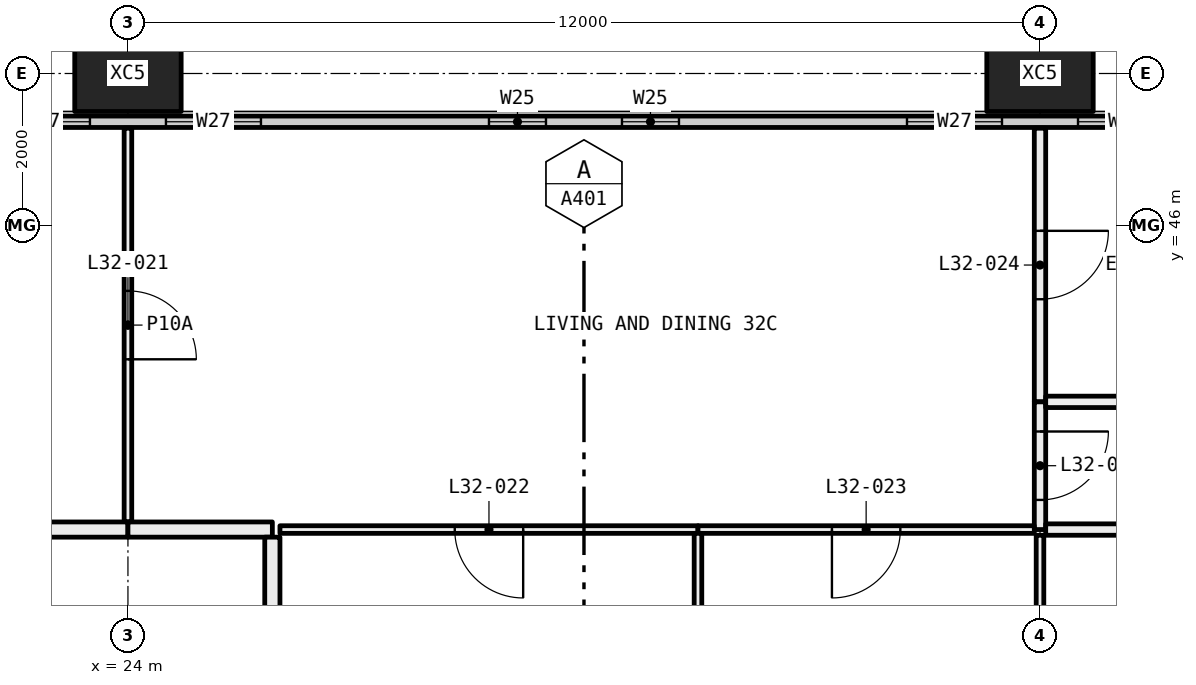
"""IFC4 building model, lengths in metres.
Left out: names, types, materials, properties, quantities, classifications, styles, units other than length and angle.
Written with IfcOpenShell. Run it as: python <this file> out.ifc"""

import sys

from ifc_helpers import new_model, si_unit, direction, frame, frame_2d, origin, origin_2d, place, context, subcontext, project, spatial, rectangle, hollow_rectangle, extrude, element, fill, save


model = new_model("IFC4")
c1 = context("Model", 3, precision=1e-05, world=origin(), true_north=direction((0.0, 1.0)))
c2 = subcontext(c1, "Body", "Model", "MODEL_VIEW")
j1 = project(units=[si_unit("LENGTHUNIT", "METRE"), si_unit("PLANEANGLEUNIT", "RADIAN")], contexts=[c1])
p1 = place(None, origin())
s1 = spatial("IfcSite", under=j1, at=p1, CompositionType="ELEMENT")
p2 = place(p1, origin())
s2 = spatial("IfcBuilding", under=s1, at=p2, CompositionType="ELEMENT")
p3 = place(p2, frame((0.0, 0.0, 124.2)))
s3 = spatial("IfcBuildingStorey", under=s2, at=p3, CompositionType="ELEMENT", Elevation=124.2)
for number, where, z_axis, x_axis in (
    (1, (24.0, 48.0, -0.4), (0.0, 0.0, 1.0), (1.0, 0.0, 0.0)),
    (2, (36.0, 48.0, -0.4), (0.0, 0.0, 1.0), (1.0, 0.0, 0.0)),
):
    element("IfcColumn", number, at=place(p3, frame(where, z_axis=z_axis, x_axis=x_axis)), inside=s3, PredefinedType="COLUMN", context=c2, shape_type="SweptSolid", body=[
        extrude(hollow_rectangle(XDim=1.4, YDim=1.0, WallThickness=0.055, at=origin_2d()), origin(), (0.0, 0.0, 1.0), 3.45),
    ])
p4 = place(p3, frame((6.56, 47.365, 0.0), z_axis=(0.0, 0.0, 1.0), x_axis=(1.0, 0.0, 0.0)))
e3 = element("IfcWall", 3, at=p4, inside=s3, PredefinedType="ELEMENTEDWALL", context=c2, shape_type="SweptSolid", body=[
    extrude(rectangle(XDim=58.88, YDim=0.15, at=frame_2d((29.44, 0.0))), origin(), (0.0, 0.0, 1.0), 3.05),
])
p5 = place(p4, frame((0.44, 0.0, 0.45)))
e4 = element("IfcOpeningElement", 4, at=p5, cuts=e3, PredefinedType="OPENING", context=c2, shape_type="SweptSolid", body=[
    extrude(rectangle(XDim=4.5, YDim=2.55, at=frame_2d((2.25, 1.275))), frame((0.0, 0.085, 0.0), z_axis=(0.0, -1.0, 0.0), x_axis=(1.0, 0.0, 0.0)), (0.0, 0.0, 1.0), 0.17),
])
p6 = place(p4, frame((5.94, 0.0, 0.45)))
e5 = element("IfcOpeningElement", 5, at=p6, cuts=e3, PredefinedType="OPENING", context=c2, shape_type="SweptSolid", body=[
    extrude(rectangle(XDim=1.25, YDim=2.55, at=frame_2d((0.625, 1.275))), frame((0.0, 0.085, 0.0), z_axis=(0.0, -1.0, 0.0), x_axis=(1.0, 0.0, 0.0)), (0.0, 0.0, 1.0), 0.17),
])
p7 = place(p4, frame((10.19, 0.0, 0.45)))
e6 = element("IfcOpeningElement", 6, at=p7, cuts=e3, PredefinedType="OPENING", context=c2, shape_type="SweptSolid", body=[
    extrude(rectangle(XDim=0.75, YDim=2.55, at=frame_2d((0.375, 1.275))), frame((0.0, 0.085, 0.0), z_axis=(0.0, -1.0, 0.0), x_axis=(1.0, 0.0, 0.0)), (0.0, 0.0, 1.0), 0.17),
])
p8 = place(p4, frame((11.94, 0.0, 0.45)))
e7 = element("IfcOpeningElement", 7, at=p8, cuts=e3, PredefinedType="OPENING", context=c2, shape_type="SweptSolid", body=[
    extrude(rectangle(XDim=0.75, YDim=2.55, at=frame_2d((0.375, 1.275))), frame((0.0, 0.085, 0.0), z_axis=(0.0, -1.0, 0.0), x_axis=(1.0, 0.0, 0.0)), (0.0, 0.0, 1.0), 0.17),
])
p9 = place(p4, frame((15.69, 0.0, 0.45)))
e8 = element("IfcOpeningElement", 8, at=p9, cuts=e3, PredefinedType="OPENING", context=c2, shape_type="SweptSolid", body=[
    extrude(rectangle(XDim=1.25, YDim=2.55, at=frame_2d((0.625, 1.275))), frame((0.0, 0.085, 0.0), z_axis=(0.0, -1.0, 0.0), x_axis=(1.0, 0.0, 0.0)), (0.0, 0.0, 1.0), 0.17),
])
p10 = place(p4, frame((17.94, 0.0, 0.45)))
e9 = element("IfcOpeningElement", 9, at=p10, cuts=e3, PredefinedType="OPENING", context=c2, shape_type="SweptSolid", body=[
    extrude(rectangle(XDim=1.25, YDim=2.55, at=frame_2d((0.625, 1.275))), frame((0.0, 0.085, 0.0), z_axis=(0.0, -1.0, 0.0), x_axis=(1.0, 0.0, 0.0)), (0.0, 0.0, 1.0), 0.17),
])
p11 = place(p4, frame((22.19, 0.0, 0.45)))
e10 = element("IfcOpeningElement", 10, at=p11, cuts=e3, PredefinedType="OPENING", context=c2, shape_type="SweptSolid", body=[
    extrude(rectangle(XDim=0.75, YDim=2.55, at=frame_2d((0.375, 1.275))), frame((0.0, 0.085, 0.0), z_axis=(0.0, -1.0, 0.0), x_axis=(1.0, 0.0, 0.0)), (0.0, 0.0, 1.0), 0.17),
])
p12 = place(p4, frame((23.94, 0.0, 0.45)))
e11 = element("IfcOpeningElement", 11, at=p12, cuts=e3, PredefinedType="OPENING", context=c2, shape_type="SweptSolid", body=[
    extrude(rectangle(XDim=0.75, YDim=2.55, at=frame_2d((0.375, 1.275))), frame((0.0, 0.085, 0.0), z_axis=(0.0, -1.0, 0.0), x_axis=(1.0, 0.0, 0.0)), (0.0, 0.0, 1.0), 0.17),
])
p13 = place(p4, frame((27.69, 0.0, 0.45)))
e12 = element("IfcOpeningElement", 12, at=p13, cuts=e3, PredefinedType="OPENING", context=c2, shape_type="SweptSolid", body=[
    extrude(rectangle(XDim=1.25, YDim=2.55, at=frame_2d((0.625, 1.275))), frame((0.0, 0.085, 0.0), z_axis=(0.0, -1.0, 0.0), x_axis=(1.0, 0.0, 0.0)), (0.0, 0.0, 1.0), 0.17),
])
p14 = place(p4, frame((29.94, 0.0, 0.45)))
e13 = element("IfcOpeningElement", 13, at=p14, cuts=e3, PredefinedType="OPENING", context=c2, shape_type="SweptSolid", body=[
    extrude(rectangle(XDim=1.25, YDim=2.55, at=frame_2d((0.625, 1.275))), frame((0.0, 0.085, 0.0), z_axis=(0.0, -1.0, 0.0), x_axis=(1.0, 0.0, 0.0)), (0.0, 0.0, 1.0), 0.17),
])
p15 = place(p4, frame((34.19, 0.0, 0.45)))
e14 = element("IfcOpeningElement", 14, at=p15, cuts=e3, PredefinedType="OPENING", context=c2, shape_type="SweptSolid", body=[
    extrude(rectangle(XDim=0.75, YDim=2.55, at=frame_2d((0.375, 1.275))), frame((0.0, 0.085, 0.0), z_axis=(0.0, -1.0, 0.0), x_axis=(1.0, 0.0, 0.0)), (0.0, 0.0, 1.0), 0.17),
])
p16 = place(p4, frame((35.94, 0.0, 0.45)))
e15 = element("IfcOpeningElement", 15, at=p16, cuts=e3, PredefinedType="OPENING", context=c2, shape_type="SweptSolid", body=[
    extrude(rectangle(XDim=0.75, YDim=2.55, at=frame_2d((0.375, 1.275))), frame((0.0, 0.085, 0.0), z_axis=(0.0, -1.0, 0.0), x_axis=(1.0, 0.0, 0.0)), (0.0, 0.0, 1.0), 0.17),
])
p17 = place(p4, frame((39.69, 0.0, 0.45)))
e16 = element("IfcOpeningElement", 16, at=p17, cuts=e3, PredefinedType="OPENING", context=c2, shape_type="SweptSolid", body=[
    extrude(rectangle(XDim=1.25, YDim=2.55, at=frame_2d((0.625, 1.275))), frame((0.0, 0.085, 0.0), z_axis=(0.0, -1.0, 0.0), x_axis=(1.0, 0.0, 0.0)), (0.0, 0.0, 1.0), 0.17),
])
p18 = place(p4, frame((41.94, 0.0, 0.45)))
e17 = element("IfcOpeningElement", 17, at=p18, cuts=e3, PredefinedType="OPENING", context=c2, shape_type="SweptSolid", body=[
    extrude(rectangle(XDim=1.25, YDim=2.55, at=frame_2d((0.625, 1.275))), frame((0.0, 0.085, 0.0), z_axis=(0.0, -1.0, 0.0), x_axis=(1.0, 0.0, 0.0)), (0.0, 0.0, 1.0), 0.17),
])
p19 = place(p4, frame((46.19, 0.0, 0.45)))
e18 = element("IfcOpeningElement", 18, at=p19, cuts=e3, PredefinedType="OPENING", context=c2, shape_type="SweptSolid", body=[
    extrude(rectangle(XDim=0.75, YDim=2.55, at=frame_2d((0.375, 1.275))), frame((0.0, 0.085, 0.0), z_axis=(0.0, -1.0, 0.0), x_axis=(1.0, 0.0, 0.0)), (0.0, 0.0, 1.0), 0.17),
])
p20 = place(p4, frame((47.94, 0.0, 0.45)))
e19 = element("IfcOpeningElement", 19, at=p20, cuts=e3, PredefinedType="OPENING", context=c2, shape_type="SweptSolid", body=[
    extrude(rectangle(XDim=0.75, YDim=2.55, at=frame_2d((0.375, 1.275))), frame((0.0, 0.085, 0.0), z_axis=(0.0, -1.0, 0.0), x_axis=(1.0, 0.0, 0.0)), (0.0, 0.0, 1.0), 0.17),
])
p21 = place(p4, frame((51.69, 0.0, 0.45)))
e20 = element("IfcOpeningElement", 20, at=p21, cuts=e3, PredefinedType="OPENING", context=c2, shape_type="SweptSolid", body=[
    extrude(rectangle(XDim=1.25, YDim=2.55, at=frame_2d((0.625, 1.275))), frame((0.0, 0.085, 0.0), z_axis=(0.0, -1.0, 0.0), x_axis=(1.0, 0.0, 0.0)), (0.0, 0.0, 1.0), 0.17),
])
p22 = place(p4, frame((53.94, 0.0, 0.45)))
e21 = element("IfcOpeningElement", 21, at=p22, cuts=e3, PredefinedType="OPENING", context=c2, shape_type="SweptSolid", body=[
    extrude(rectangle(XDim=4.5, YDim=2.55, at=frame_2d((2.25, 1.275))), frame((0.0, 0.085, 0.0), z_axis=(0.0, -1.0, 0.0), x_axis=(1.0, 0.0, 0.0)), (0.0, 0.0, 1.0), 0.17),
])
p23 = place(p3, frame((24.0, 42.1, 0.0), z_axis=(0.0, 0.0, 1.0), x_axis=(0.0, 1.0, 0.0)))
e22 = element("IfcWall", 22, at=p23, inside=s3, PredefinedType="PARTITIONING", context=c2, shape_type="SweptSolid", body=[
    extrude(rectangle(XDim=5.18, YDim=0.1, at=frame_2d((2.59, 0.0))), origin(), (0.0, 0.0, 1.0), 3.05),
])
p24 = place(p23, frame((2.14, 0.0, 0.0)))
e23 = element("IfcOpeningElement", 23, at=p24, cuts=e22, PredefinedType="OPENING", context=c2, shape_type="SweptSolid", body=[
    extrude(rectangle(XDim=0.9, YDim=2.1, at=frame_2d((0.45, 1.05))), frame((0.0, 0.06, 0.0), z_axis=(0.0, -1.0, 0.0), x_axis=(1.0, 0.0, 0.0)), (0.0, 0.0, 1.0), 0.12),
])
p25 = place(p3, frame((18.0, 42.0, 0.0), z_axis=(0.0, 0.0, 1.0), x_axis=(1.0, 0.0, 0.0)))
e24 = element("IfcWall", 24, at=p25, inside=s3, PredefinedType="PARTITIONING", context=c2, shape_type="SweptSolid", body=[
    extrude(rectangle(XDim=6.0, YDim=0.2, at=frame_2d((3.0, 0.0))), origin(), (0.0, 0.0, 1.0), 3.05),
])
p26 = place(p25, frame((2.5, 0.0, 0.0)))
e25 = element("IfcOpeningElement", 25, at=p26, cuts=e24, PredefinedType="OPENING", context=c2, shape_type="SweptSolid", body=[
    extrude(rectangle(XDim=1.0, YDim=2.1, at=frame_2d((0.5, 1.05))), frame((0.0, 0.11, 0.0), z_axis=(0.0, -1.0, 0.0), x_axis=(1.0, 0.0, 0.0)), (0.0, 0.0, 1.0), 0.22),
])
p27 = place(p3, frame((36.0, 43.68, 0.0), z_axis=(0.0, 0.0, 1.0), x_axis=(0.0, 1.0, 0.0)))
e26 = element("IfcWall", 26, at=p27, inside=s3, PredefinedType="PARTITIONING", context=c2, shape_type="SweptSolid", body=[
    extrude(rectangle(XDim=3.6, YDim=0.15, at=frame_2d((1.8, 0.0))), origin(), (0.0, 0.0, 1.0), 2.45),
])
p28 = place(p27, frame((1.35, 0.0, 0.0)))
e27 = element("IfcOpeningElement", 27, at=p28, cuts=e26, PredefinedType="OPENING", context=c2, shape_type="SweptSolid", body=[
    extrude(rectangle(XDim=0.9, YDim=2.1, at=frame_2d((0.45, 1.05))), frame((0.0, 0.085, 0.0), z_axis=(0.0, -1.0, 0.0), x_axis=(1.0, 0.0, 0.0)), (0.0, 0.0, 1.0), 0.17),
])
p29 = place(p3, frame((36.0, 42.0, 0.0), z_axis=(0.0, 0.0, 1.0), x_axis=(0.0, 1.0, 0.0)))
e28 = element("IfcWall", 28, at=p29, inside=s3, PredefinedType="PARTITIONING", context=c2, shape_type="SweptSolid", body=[
    extrude(rectangle(XDim=1.68, YDim=0.15, at=frame_2d((0.84, 0.0))), origin(), (0.0, 0.0, 1.0), 2.45),
])
p30 = place(p29, frame((0.39, 0.0, 0.0)))
e29 = element("IfcOpeningElement", 29, at=p30, cuts=e28, PredefinedType="OPENING", context=c2, shape_type="SweptSolid", body=[
    extrude(rectangle(XDim=0.9, YDim=2.1, at=frame_2d((0.45, 1.05))), frame((0.0, 0.085, 0.0), z_axis=(0.0, -1.0, 0.0), x_axis=(1.0, 0.0, 0.0)), (0.0, 0.0, 1.0), 0.17),
])
p31 = place(p3, frame((26.0, 42.0, 0.0), z_axis=(0.0, 0.0, 1.0), x_axis=(1.0, 0.0, 0.0)))
e30 = element("IfcWall", 30, at=p31, inside=s3, PredefinedType="PARTITIONING", context=c2, shape_type="SweptSolid", body=[
    extrude(rectangle(XDim=5.5, YDim=0.1, at=frame_2d((2.75, 0.0))), origin(), (0.0, 0.0, 1.0), 3.05),
])
p32 = place(p31, frame((2.3, 0.0, 0.0)))
e31 = element("IfcOpeningElement", 31, at=p32, cuts=e30, PredefinedType="OPENING", context=c2, shape_type="SweptSolid", body=[
    extrude(rectangle(XDim=0.9, YDim=2.1, at=frame_2d((0.45, 1.05))), frame((0.0, 0.06, 0.0), z_axis=(0.0, -1.0, 0.0), x_axis=(1.0, 0.0, 0.0)), (0.0, 0.0, 1.0), 0.12),
])
p33 = place(p3, frame((31.5, 42.0, 0.0), z_axis=(0.0, 0.0, 1.0), x_axis=(1.0, 0.0, 0.0)))
e32 = element("IfcWall", 32, at=p33, inside=s3, PredefinedType="PARTITIONING", context=c2, shape_type="SweptSolid", body=[
    extrude(rectangle(XDim=4.425, YDim=0.1, at=frame_2d((2.212, 0.0))), origin(), (0.0, 0.0, 1.0), 2.45),
])
p34 = place(p33, frame((1.762, 0.0, 0.0)))
e33 = element("IfcOpeningElement", 33, at=p34, cuts=e32, PredefinedType="OPENING", context=c2, shape_type="SweptSolid", body=[
    extrude(rectangle(XDim=0.9, YDim=2.1, at=frame_2d((0.45, 1.05))), frame((0.0, 0.06, 0.0), z_axis=(0.0, -1.0, 0.0), x_axis=(1.0, 0.0, 0.0)), (0.0, 0.0, 1.0), 0.12),
])
p35 = place(p3, frame((24.0, 42.0, 0.0), z_axis=(0.0, 0.0, 1.0), x_axis=(1.0, 0.0, 0.0)))
e34 = element("IfcWall", 34, at=p35, inside=s3, PredefinedType="PARTITIONING", context=c2, shape_type="SweptSolid", body=[
    extrude(rectangle(XDim=1.9, YDim=0.2, at=frame_2d((0.95, 0.0))), origin(), (0.0, 0.0, 1.0), 3.05),
])
for number, where, z_axis, x_axis in (
    (35, (36.075, 43.68, 0.0), (0.0, 0.0, 1.0), (1.0, 0.0, 0.0)),
    (36, (36.075, 42.0, 0.0), (0.0, 0.0, 1.0), (1.0, 0.0, 0.0)),
):
    element("IfcWall", number, at=place(p3, frame(where, z_axis=z_axis, x_axis=x_axis)), inside=s3, PredefinedType="PARTITIONING", context=c2, shape_type="SweptSolid", body=[
        extrude(rectangle(XDim=5.825, YDim=0.15, at=frame_2d((2.913, 0.0))), origin(), (0.0, 0.0, 1.0), 2.45),
    ])
p36 = place(p3, frame((31.5, 36.1, 0.0), z_axis=(0.0, 0.0, 1.0), x_axis=(0.0, 1.0, 0.0)))
e37 = element("IfcWall", 37, at=p36, inside=s3, PredefinedType="PARTITIONING", context=c2, shape_type="SweptSolid", body=[
    extrude(rectangle(XDim=5.85, YDim=0.1, at=frame_2d((2.925, 0.0))), origin(), (0.0, 0.0, 1.0), 3.05),
])
p37 = place(p3, frame((25.9, 41.9, 0.0), z_axis=(0.0, 0.0, 1.0), x_axis=(0.0, -1.0, 0.0)))
e38 = element("IfcWall", 38, at=p37, inside=s3, PredefinedType="PARTITIONING", context=c2, shape_type="SweptSolid", body=[
    extrude(rectangle(XDim=6.2, YDim=0.2, at=frame_2d((3.1, 0.0))), origin(), (0.0, 0.0, 1.0), 2.45),
])
p38 = place(p3, frame((36.0, 36.75, 0.0), z_axis=(0.0, 0.0, 1.0), x_axis=(0.0, 1.0, 0.0)))
e39 = element("IfcWall", 39, at=p38, inside=s3, PredefinedType="PARTITIONING", context=c2, shape_type="SweptSolid", body=[
    extrude(rectangle(XDim=5.175, YDim=0.1, at=frame_2d((2.587, 0.0))), origin(), (0.0, 0.0, 1.0), 2.45),
])
p39 = place(p38, frame((2.137, 0.0, 0.0)))
e40 = element("IfcOpeningElement", 40, at=p39, cuts=e39, PredefinedType="OPENING", context=c2, shape_type="SweptSolid", body=[
    extrude(rectangle(XDim=0.9, YDim=2.1, at=frame_2d((0.45, 1.05))), frame((0.0, 0.06, 0.0), z_axis=(0.0, -1.0, 0.0), x_axis=(1.0, 0.0, 0.0)), (0.0, 0.0, 1.0), 0.12),
])
p40 = place(p9, origin())
e41 = element("IfcWindow", 41, at=p40, inside=s3, PartitioningType="SINGLE_PANEL", PredefinedType="WINDOW", context=c2, shape_type="SweptSolid", body=[
    extrude(rectangle(XDim=1.25, YDim=2.55, at=frame_2d((0.625, 1.275))), frame((0.0, 0.03, 0.0), z_axis=(0.0, -1.0, 0.0), x_axis=(1.0, 0.0, 0.0)), (0.0, 0.0, 1.0), 0.06),
])
fill(e8, e41)
p41 = place(p10, origin())
e42 = element("IfcWindow", 42, at=p41, inside=s3, PartitioningType="SINGLE_PANEL", PredefinedType="WINDOW", context=c2, shape_type="SweptSolid", body=[
    extrude(rectangle(XDim=1.25, YDim=2.55, at=frame_2d((0.625, 1.275))), frame((0.0, 0.03, 0.0), z_axis=(0.0, -1.0, 0.0), x_axis=(1.0, 0.0, 0.0)), (0.0, 0.0, 1.0), 0.06),
])
fill(e9, e42)
p42 = place(p11, origin())
e43 = element("IfcWindow", 43, at=p42, inside=s3, PartitioningType="SINGLE_PANEL", PredefinedType="WINDOW", context=c2, shape_type="SweptSolid", body=[
    extrude(rectangle(XDim=0.75, YDim=2.55, at=frame_2d((0.375, 1.275))), frame((0.0, 0.03, 0.0), z_axis=(0.0, -1.0, 0.0), x_axis=(1.0, 0.0, 0.0)), (0.0, 0.0, 1.0), 0.06),
])
fill(e10, e43)
p43 = place(p12, origin())
e44 = element("IfcWindow", 44, at=p43, inside=s3, PartitioningType="SINGLE_PANEL", PredefinedType="WINDOW", context=c2, shape_type="SweptSolid", body=[
    extrude(rectangle(XDim=0.75, YDim=2.55, at=frame_2d((0.375, 1.275))), frame((0.0, 0.03, 0.0), z_axis=(0.0, -1.0, 0.0), x_axis=(1.0, 0.0, 0.0)), (0.0, 0.0, 1.0), 0.06),
])
fill(e11, e44)
p44 = place(p13, origin())
e45 = element("IfcWindow", 45, at=p44, inside=s3, PartitioningType="SINGLE_PANEL", PredefinedType="WINDOW", context=c2, shape_type="SweptSolid", body=[
    extrude(rectangle(XDim=1.25, YDim=2.55, at=frame_2d((0.625, 1.275))), frame((0.0, 0.03, 0.0), z_axis=(0.0, -1.0, 0.0), x_axis=(1.0, 0.0, 0.0)), (0.0, 0.0, 1.0), 0.06),
])
fill(e12, e45)
p45 = place(p14, origin())
e46 = element("IfcWindow", 46, at=p45, inside=s3, PartitioningType="SINGLE_PANEL", PredefinedType="WINDOW", context=c2, shape_type="SweptSolid", body=[
    extrude(rectangle(XDim=1.25, YDim=2.55, at=frame_2d((0.625, 1.275))), frame((0.0, 0.03, 0.0), z_axis=(0.0, -1.0, 0.0), x_axis=(1.0, 0.0, 0.0)), (0.0, 0.0, 1.0), 0.06),
])
fill(e13, e46)
p46 = place(p24, frame((0.9, 0.0, 0.0), x_axis=(-1.0, 0.0, 0.0)))
e47 = element("IfcDoor", 47, at=p46, inside=s3, OperationType="SINGLE_SWING_LEFT", PredefinedType="DOOR", context=c2, shape_type="SweptSolid", body=[
    extrude(rectangle(XDim=0.9, YDim=2.1, at=frame_2d((0.45, 1.05))), frame((0.0, 0.025, 0.0), z_axis=(0.0, -1.0, 0.0), x_axis=(1.0, 0.0, 0.0)), (0.0, 0.0, 1.0), 0.05),
])
fill(e23, e47)
p47 = place(p32, frame((0.9, 0.0, 0.0), x_axis=(-1.0, 0.0, 0.0)))
e48 = element("IfcDoor", 48, at=p47, inside=s3, OperationType="SINGLE_SWING_RIGHT", PredefinedType="DOOR", context=c2, shape_type="SweptSolid", body=[
    extrude(rectangle(XDim=0.9, YDim=2.1, at=frame_2d((0.45, 1.05))), frame((0.0, 0.025, 0.0), z_axis=(0.0, -1.0, 0.0), x_axis=(1.0, 0.0, 0.0)), (0.0, 0.0, 1.0), 0.05),
])
fill(e31, e48)
p48 = place(p34, frame((0.9, 0.0, 0.0), x_axis=(-1.0, 0.0, 0.0)))
e49 = element("IfcDoor", 49, at=p48, inside=s3, OperationType="SINGLE_SWING_LEFT", PredefinedType="DOOR", context=c2, shape_type="SweptSolid", body=[
    extrude(rectangle(XDim=0.9, YDim=2.1, at=frame_2d((0.45, 1.05))), frame((0.0, 0.025, 0.0), z_axis=(0.0, -1.0, 0.0), x_axis=(1.0, 0.0, 0.0)), (0.0, 0.0, 1.0), 0.05),
])
fill(e33, e49)
p49 = place(p28, frame((0.9, 0.0, 0.0), x_axis=(-1.0, 0.0, 0.0)))
e50 = element("IfcDoor", 50, at=p49, inside=s3, OperationType="SINGLE_SWING_RIGHT", PredefinedType="DOOR", context=c2, shape_type="SweptSolid", body=[
    extrude(rectangle(XDim=0.9, YDim=2.1, at=frame_2d((0.45, 1.05))), frame((0.0, 0.025, 0.0), z_axis=(0.0, -1.0, 0.0), x_axis=(1.0, 0.0, 0.0)), (0.0, 0.0, 1.0), 0.05),
])
fill(e27, e50)
p50 = place(p30, frame((0.9, 0.0, 0.0), x_axis=(-1.0, 0.0, 0.0)))
e51 = element("IfcDoor", 51, at=p50, inside=s3, OperationType="SINGLE_SWING_RIGHT", PredefinedType="DOOR", context=c2, shape_type="SweptSolid", body=[
    extrude(rectangle(XDim=0.9, YDim=2.1, at=frame_2d((0.45, 1.05))), frame((0.0, 0.025, 0.0), z_axis=(0.0, -1.0, 0.0), x_axis=(1.0, 0.0, 0.0)), (0.0, 0.0, 1.0), 0.05),
])
fill(e29, e51)
save(model, sys.argv[1])
